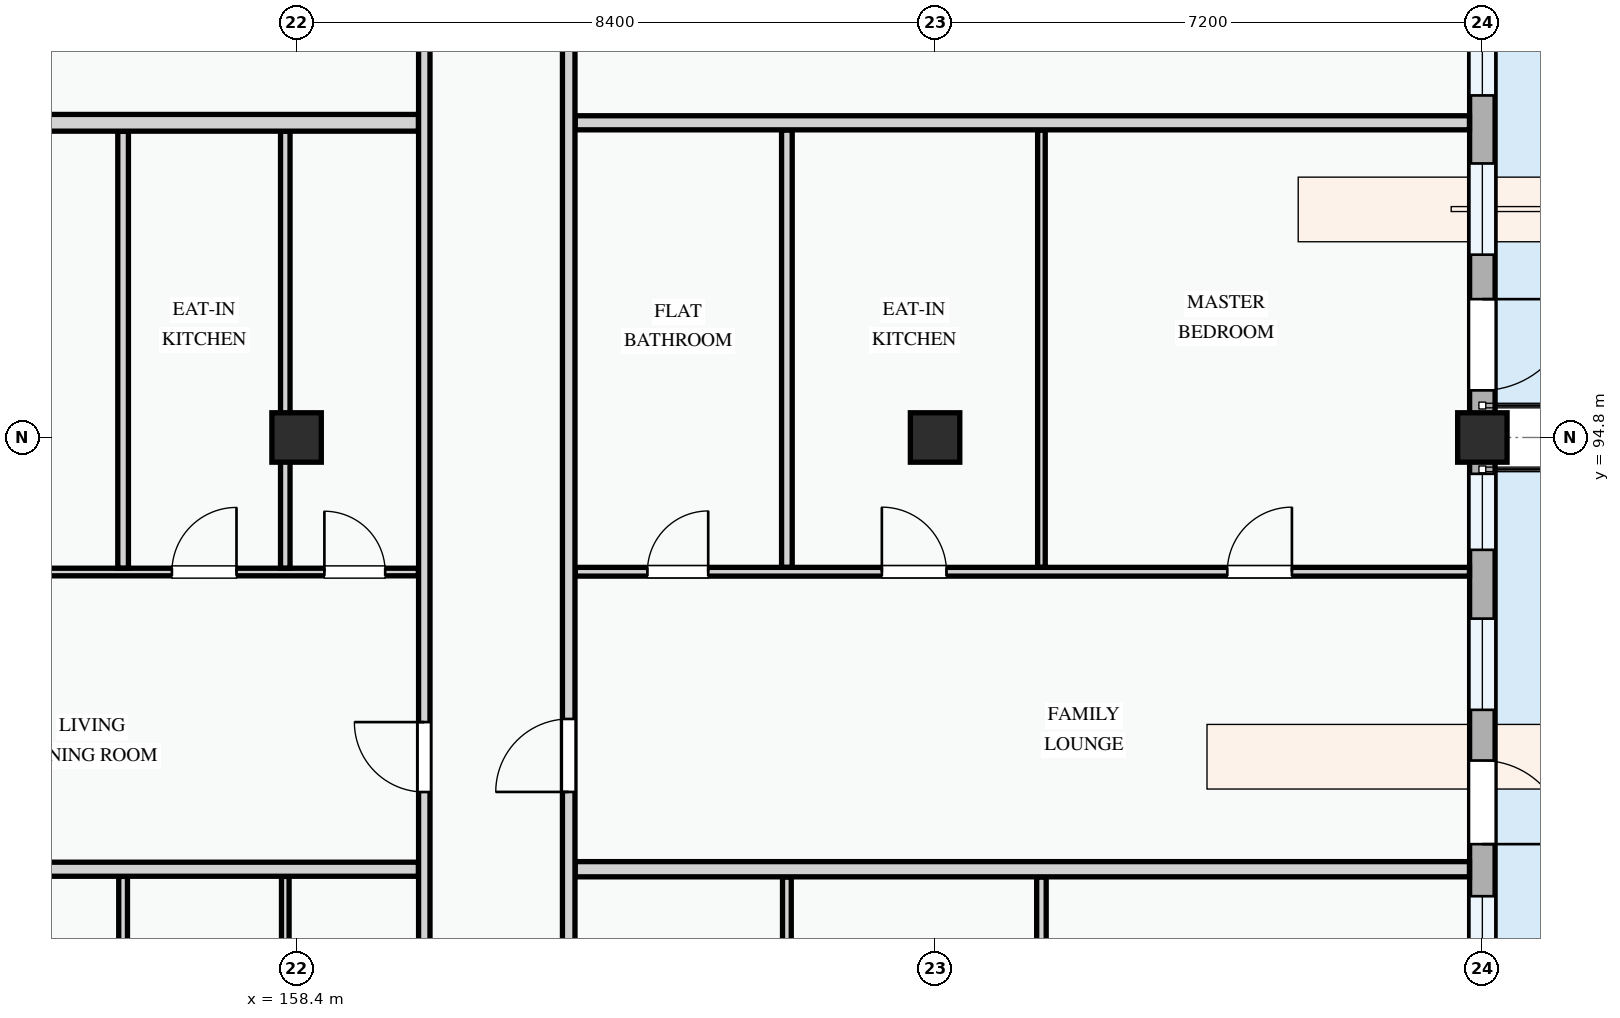
"""IFC4 building model, lengths in metres.
Left out: names, types, materials, properties, quantities, classifications, styles, units other than length and angle.
Written with IfcOpenShell. Run it as: python <this file> out.ifc"""

import sys

from ifc_helpers import new_model, si_unit, direction, frame, frame_2d, origin, origin_2d, place, context, subcontext, project, spatial, rectangle, extrude, element, fill, save


model = new_model("IFC4")
c1 = context("Model", 3, precision=1e-05, world=origin(), true_north=direction((0.0, 1.0)))
c2 = subcontext(c1, "Body", "Model", "MODEL_VIEW")
j1 = project(units=[si_unit("LENGTHUNIT", "METRE"), si_unit("PLANEANGLEUNIT", "RADIAN")], contexts=[c1])
p1 = place(None, origin())
s1 = spatial("IfcSite", under=j1, at=p1, CompositionType="ELEMENT")
p2 = place(p1, origin())
s2 = spatial("IfcBuilding", under=s1, at=p2, CompositionType="ELEMENT")
p3 = place(p2, frame((0.0, 0.0, 14.7)))
s3 = spatial("IfcBuildingStorey", under=s2, at=p3, CompositionType="ELEMENT", Elevation=14.7)
for number, where, z_axis, x_axis in (
    (1, (158.4, 94.8, 0.0), (0.0, 0.0, 1.0), (1.0, 0.0, 0.0)),
    (2, (166.8, 94.8, 0.0), (0.0, 0.0, 1.0), (1.0, 0.0, 0.0)),
    (3, (174.0, 94.8, 0.0), (0.0, 0.0, 1.0), (1.0, 0.0, 0.0)),
):
    element("IfcColumn", number, at=place(p3, frame(where, z_axis=z_axis, x_axis=x_axis)), inside=s3, PredefinedType="COLUMN", context=c2, shape_type="SweptSolid", body=[
        extrude(rectangle(XDim=0.65, YDim=0.65, at=origin_2d()), origin(), (0.0, 0.0, 1.0), 3.3),
    ])
p4 = place(p3, frame((174.0, 86.4, 0.0), z_axis=(0.0, 0.0, 1.0), x_axis=(0.0, 1.0, 0.0)))
e4 = element("IfcWall", 4, at=p4, inside=s3, PredefinedType="STANDARD", context=c2, shape_type="SweptSolid", body=[
    extrude(rectangle(XDim=8.4, YDim=0.335, at=frame_2d((4.2, 0.0))), origin(), (0.0, 0.0, 1.0), 2.425),
])
p5 = place(p4, frame((3.05, 0.0, 0.0)))
e5 = element("IfcOpeningElement", 5, at=p5, cuts=e4, PredefinedType="OPENING", context=c2, shape_type="SweptSolid", body=[
    extrude(rectangle(XDim=1.1, YDim=2.15, at=frame_2d((0.55, 1.075))), frame((0.0, 0.177, 0.0), z_axis=(0.0, -1.0, 0.0), x_axis=(1.0, 0.0, 0.0)), (0.0, 0.0, 1.0), 0.355),
])
p6 = place(p4, frame((0.545, 0.0, 0.78)))
e6 = element("IfcOpeningElement", 6, at=p6, cuts=e4, PredefinedType="OPENING", context=c2, shape_type="SweptSolid", body=[
    extrude(rectangle(XDim=1.82, YDim=1.46, at=frame_2d((0.91, 0.73))), frame((0.0, 0.177, 0.0), z_axis=(0.0, -1.0, 0.0), x_axis=(1.0, 0.0, 0.0)), (0.0, 0.0, 1.0), 0.355),
])
p7 = place(p4, frame((4.817, 0.0, 0.78)))
e7 = element("IfcOpeningElement", 7, at=p7, cuts=e4, PredefinedType="OPENING", context=c2, shape_type="SweptSolid", body=[
    extrude(rectangle(XDim=1.2, YDim=1.35, at=frame_2d((0.6, 0.675))), frame((0.0, 0.177, 0.0), z_axis=(0.0, -1.0, 0.0), x_axis=(1.0, 0.0, 0.0)), (0.0, 0.0, 1.0), 0.355),
])
p8 = place(p4, frame((6.922, 0.0, 0.78)))
e8 = element("IfcOpeningElement", 8, at=p8, cuts=e4, PredefinedType="OPENING", context=c2, shape_type="SweptSolid", body=[
    extrude(rectangle(XDim=1.0, YDim=1.25, at=frame_2d((0.5, 0.625))), frame((0.0, 0.177, 0.0), z_axis=(0.0, -1.0, 0.0), x_axis=(1.0, 0.0, 0.0)), (0.0, 0.0, 1.0), 0.355),
])
p9 = place(p3, frame((174.0, 94.8, 0.0), z_axis=(0.0, 0.0, 1.0), x_axis=(0.0, 1.0, 0.0)))
e9 = element("IfcWall", 9, at=p9, inside=s3, PredefinedType="STANDARD", context=c2, shape_type="SweptSolid", body=[
    extrude(rectangle(XDim=6.0, YDim=0.335, at=frame_2d((3.0, 0.0))), origin(), (0.0, 0.0, 1.0), 2.575),
])
p10 = place(p9, frame((0.62, 0.0, 0.0)))
e10 = element("IfcOpeningElement", 10, at=p10, cuts=e9, PredefinedType="OPENING", context=c2, shape_type="SweptSolid", body=[
    extrude(rectangle(XDim=1.2, YDim=2.15, at=frame_2d((0.6, 1.075))), frame((0.0, 0.177, 0.0), z_axis=(0.0, -1.0, 0.0), x_axis=(1.0, 0.0, 0.0)), (0.0, 0.0, 1.0), 0.355),
])
p11 = place(p9, frame((2.405, 0.0, 0.78)))
e11 = element("IfcOpeningElement", 11, at=p11, cuts=e9, PredefinedType="OPENING", context=c2, shape_type="SweptSolid", body=[
    extrude(rectangle(XDim=1.2, YDim=1.5, at=frame_2d((0.6, 0.75))), frame((0.0, 0.177, 0.0), z_axis=(0.0, -1.0, 0.0), x_axis=(1.0, 0.0, 0.0)), (0.0, 0.0, 1.0), 0.355),
])
p12 = place(p9, frame((4.5, 0.0, 0.78)))
e12 = element("IfcOpeningElement", 12, at=p12, cuts=e9, PredefinedType="OPENING", context=c2, shape_type="SweptSolid", body=[
    extrude(rectangle(XDim=0.95, YDim=1.15, at=frame_2d((0.475, 0.575))), frame((0.0, 0.177, 0.0), z_axis=(0.0, -1.0, 0.0), x_axis=(1.0, 0.0, 0.0)), (0.0, 0.0, 1.0), 0.355),
])
p13 = place(p3, frame((156.118, 84.655, 0.0), z_axis=(0.0, 0.0, 1.0), x_axis=(0.0, 1.0, 0.0)))
e13 = element("IfcWall", 13, at=p13, inside=s3, PredefinedType="PARTITIONING", context=c2, shape_type="SweptSolid", body=[
    extrude(rectangle(XDim=4.371, YDim=0.115, at=frame_2d((2.186, 0.0))), origin(), (0.0, 0.0, 1.0), 3.0),
])
p14 = place(p3, frame((158.251, 84.655, 0.0), z_axis=(0.0, 0.0, 1.0), x_axis=(0.0, 1.0, 0.0)))
e14 = element("IfcWall", 14, at=p14, inside=s3, PredefinedType="PARTITIONING", context=c2, shape_type="SweptSolid", body=[
    extrude(rectangle(XDim=4.371, YDim=0.1, at=frame_2d((2.186, 0.0))), origin(), (0.0, 0.0, 1.0), 2.425),
])
p15 = place(p3, frame((168.199, 84.689, 0.0), z_axis=(0.0, 0.0, 1.0), x_axis=(0.0, 1.0, 0.0)))
e15 = element("IfcWall", 15, at=p15, inside=s3, PredefinedType="PARTITIONING", context=c2, shape_type="SweptSolid", body=[
    extrude(rectangle(XDim=4.329, YDim=0.125, at=frame_2d((2.165, 0.0))), origin(), (0.0, 0.0, 1.0), 3.0),
])
p16 = place(p3, frame((164.85, 84.689, 0.0), z_axis=(0.0, 0.0, 1.0), x_axis=(0.0, 1.0, 0.0)))
e16 = element("IfcWall", 16, at=p16, inside=s3, PredefinedType="PARTITIONING", context=c2, shape_type="SweptSolid", body=[
    extrude(rectangle(XDim=4.329, YDim=0.115, at=frame_2d((2.165, 0.0))), origin(), (0.0, 0.0, 1.0), 3.0),
])
p17 = place(p3, frame((152.57, 93.03, 0.0), z_axis=(0.0, 0.0, 1.0), x_axis=(1.0, 0.0, 0.0)))
e17 = element("IfcWall", 17, at=p17, inside=s3, PredefinedType="PARTITIONING", context=c2, shape_type="SweptSolid", body=[
    extrude(rectangle(XDim=7.433, YDim=0.1, at=frame_2d((3.717, 0.0))), origin(), (0.0, 0.0, 1.0), 3.0),
])
p18 = place(p17, frame((1.294, 0.0, 0.0)))
e18 = element("IfcOpeningElement", 18, at=p18, cuts=e17, PredefinedType="OPENING", context=c2, shape_type="SweptSolid", body=[
    extrude(rectangle(XDim=0.85, YDim=2.1, at=frame_2d((0.425, 1.05))), frame((0.0, 0.06, 0.0), z_axis=(0.0, -1.0, 0.0), x_axis=(1.0, 0.0, 0.0)), (0.0, 0.0, 1.0), 0.12),
])
p19 = place(p17, frame((4.19, 0.0, 0.0)))
e19 = element("IfcOpeningElement", 19, at=p19, cuts=e17, PredefinedType="OPENING", context=c2, shape_type="SweptSolid", body=[
    extrude(rectangle(XDim=0.85, YDim=2.1, at=frame_2d((0.425, 1.05))), frame((0.0, 0.06, 0.0), z_axis=(0.0, -1.0, 0.0), x_axis=(1.0, 0.0, 0.0)), (0.0, 0.0, 1.0), 0.12),
])
p20 = place(p17, frame((6.196, 0.0, 0.0)))
e20 = element("IfcOpeningElement", 20, at=p20, cuts=e17, PredefinedType="OPENING", context=c2, shape_type="SweptSolid", body=[
    extrude(rectangle(XDim=0.8, YDim=2.1, at=frame_2d((0.4, 1.05))), frame((0.0, 0.06, 0.0), z_axis=(0.0, -1.0, 0.0), x_axis=(1.0, 0.0, 0.0)), (0.0, 0.0, 1.0), 0.12),
])
p21 = place(p3, frame((156.118, 93.082, 0.0), z_axis=(0.0, 0.0, 1.0), x_axis=(0.0, 1.0, 0.0)))
e21 = element("IfcWall", 21, at=p21, inside=s3, PredefinedType="PARTITIONING", context=c2, shape_type="SweptSolid", body=[
    extrude(rectangle(XDim=5.746, YDim=0.14, at=frame_2d((2.873, 0.0))), origin(), (0.0, 0.0, 1.0), 3.0),
])
p22 = place(p3, frame((158.251, 93.082, 0.0), z_axis=(0.0, 0.0, 1.0), x_axis=(0.0, 1.0, 0.0)))
e22 = element("IfcWall", 22, at=p22, inside=s3, PredefinedType="PARTITIONING", context=c2, shape_type="SweptSolid", body=[
    extrude(rectangle(XDim=5.746, YDim=0.125, at=frame_2d((2.873, 0.0))), origin(), (0.0, 0.0, 1.0), 2.425),
])
p23 = place(p3, frame((162.064, 93.034, 0.0), z_axis=(0.0, 0.0, 1.0), x_axis=(1.0, 0.0, 0.0)))
e23 = element("IfcWall", 23, at=p23, inside=s3, PredefinedType="PARTITIONING", context=c2, shape_type="SweptSolid", body=[
    extrude(rectangle(XDim=11.766, YDim=0.115, at=frame_2d((5.883, 0.0))), origin(), (0.0, 0.0, 1.0), 3.0),
])
p24 = place(p23, frame((0.951, 0.0, 0.0)))
e24 = element("IfcOpeningElement", 24, at=p24, cuts=e23, PredefinedType="OPENING", context=c2, shape_type="SweptSolid", body=[
    extrude(rectangle(XDim=0.8, YDim=2.1, at=frame_2d((0.4, 1.05))), frame((0.0, 0.067, 0.0), z_axis=(0.0, -1.0, 0.0), x_axis=(1.0, 0.0, 0.0)), (0.0, 0.0, 1.0), 0.135),
])
p25 = place(p23, frame((4.035, 0.0, 0.0)))
e25 = element("IfcOpeningElement", 25, at=p25, cuts=e23, PredefinedType="OPENING", context=c2, shape_type="SweptSolid", body=[
    extrude(rectangle(XDim=0.85, YDim=2.1, at=frame_2d((0.425, 1.05))), frame((0.0, 0.067, 0.0), z_axis=(0.0, -1.0, 0.0), x_axis=(1.0, 0.0, 0.0)), (0.0, 0.0, 1.0), 0.135),
])
p26 = place(p23, frame((8.58, 0.0, 0.0)))
e26 = element("IfcOpeningElement", 26, at=p26, cuts=e23, PredefinedType="OPENING", context=c2, shape_type="SweptSolid", body=[
    extrude(rectangle(XDim=0.85, YDim=2.1, at=frame_2d((0.425, 1.05))), frame((0.0, 0.067, 0.0), z_axis=(0.0, -1.0, 0.0), x_axis=(1.0, 0.0, 0.0)), (0.0, 0.0, 1.0), 0.135),
])
p27 = place(p3, frame((168.199, 93.093, 0.0), z_axis=(0.0, 0.0, 1.0), x_axis=(0.0, 1.0, 0.0)))
e27 = element("IfcWall", 27, at=p27, inside=s3, PredefinedType="PARTITIONING", context=c2, shape_type="SweptSolid", body=[
    extrude(rectangle(XDim=5.752, YDim=0.1, at=frame_2d((2.876, 0.0))), origin(), (0.0, 0.0, 1.0), 3.0),
])
p28 = place(p3, frame((164.85, 93.093, 0.0), z_axis=(0.0, 0.0, 1.0), x_axis=(0.0, 1.0, 0.0)))
e28 = element("IfcWall", 28, at=p28, inside=s3, PredefinedType="PARTITIONING", context=c2, shape_type="SweptSolid", body=[
    extrude(rectangle(XDim=5.752, YDim=0.14, at=frame_2d((2.876, 0.0))), origin(), (0.0, 0.0, 1.0), 3.0),
])
p29 = place(p3, frame((152.57, 89.12, 0.0), z_axis=(0.0, 0.0, 1.0), x_axis=(1.0, 0.0, 0.0)))
e29 = element("IfcWall", 29, at=p29, inside=s3, PredefinedType="PARTITIONING", context=c2, shape_type="SweptSolid", body=[
    extrude(rectangle(XDim=7.433, YDim=0.185, at=frame_2d((3.717, 0.0))), origin(), (0.0, 0.0, 1.0), 3.0),
])
p30 = place(p3, frame((162.064, 89.12, 0.0), z_axis=(0.0, 0.0, 1.0), x_axis=(1.0, 0.0, 0.0)))
e30 = element("IfcWall", 30, at=p30, inside=s3, PredefinedType="PARTITIONING", context=c2, shape_type="SweptSolid", body=[
    extrude(rectangle(XDim=11.766, YDim=0.2, at=frame_2d((5.883, 0.0))), origin(), (0.0, 0.0, 1.0), 3.0),
])
p31 = place(p3, frame((152.57, 98.94, 0.0), z_axis=(0.0, 0.0, 1.0), x_axis=(1.0, 0.0, 0.0)))
e31 = element("IfcWall", 31, at=p31, inside=s3, PredefinedType="PARTITIONING", context=c2, shape_type="SweptSolid", body=[
    extrude(rectangle(XDim=7.433, YDim=0.22, at=frame_2d((3.717, 0.0))), origin(), (0.0, 0.0, 1.0), 3.0),
])
p32 = place(p3, frame((162.064, 98.94, 0.0), z_axis=(0.0, 0.0, 1.0), x_axis=(1.0, 0.0, 0.0)))
e32 = element("IfcWall", 32, at=p32, inside=s3, PredefinedType="PARTITIONING", context=c2, shape_type="SweptSolid", body=[
    extrude(rectangle(XDim=11.766, YDim=0.185, at=frame_2d((5.883, 0.0))), origin(), (0.0, 0.0, 1.0), 3.0),
])
p33 = place(p3, frame((160.08, 80.57, 0.0), z_axis=(0.0, 0.0, 1.0), x_axis=(0.0, 1.0, 0.0)))
e33 = element("IfcWall", 33, at=p33, inside=s3, PredefinedType="PARTITIONING", context=c2, shape_type="SweptSolid", body=[
    extrude(rectangle(XDim=28.771, YDim=0.15, at=frame_2d((14.385, 0.0))), origin(), (0.0, 0.0, 1.0), 3.0),
])
p34 = place(p33, frame((2.31, 0.0, 0.0)))
e34 = element("IfcOpeningElement", 34, at=p34, cuts=e33, PredefinedType="OPENING", context=c2, shape_type="SweptSolid", body=[
    extrude(rectangle(XDim=0.92, YDim=2.1, at=frame_2d((0.46, 1.05))), frame((0.0, 0.085, 0.0), z_axis=(0.0, -1.0, 0.0), x_axis=(1.0, 0.0, 0.0)), (0.0, 0.0, 1.0), 0.17),
])
p35 = place(p33, frame((9.566, 0.0, 0.0)))
e35 = element("IfcOpeningElement", 35, at=p35, cuts=e33, PredefinedType="OPENING", context=c2, shape_type="SweptSolid", body=[
    extrude(rectangle(XDim=0.92, YDim=2.1, at=frame_2d((0.46, 1.05))), frame((0.0, 0.085, 0.0), z_axis=(0.0, -1.0, 0.0), x_axis=(1.0, 0.0, 0.0)), (0.0, 0.0, 1.0), 0.17),
])
p36 = place(p33, frame((22.361, 0.0, 0.0)))
e36 = element("IfcOpeningElement", 36, at=p36, cuts=e33, PredefinedType="OPENING", context=c2, shape_type="SweptSolid", body=[
    extrude(rectangle(XDim=0.92, YDim=2.1, at=frame_2d((0.46, 1.05))), frame((0.0, 0.085, 0.0), z_axis=(0.0, -1.0, 0.0), x_axis=(1.0, 0.0, 0.0)), (0.0, 0.0, 1.0), 0.17),
])
p37 = place(p3, frame((161.98, 80.57, 0.0), z_axis=(0.0, 0.0, 1.0), x_axis=(0.0, 1.0, 0.0)))
e37 = element("IfcWall", 37, at=p37, inside=s3, PredefinedType="PARTITIONING", context=c2, shape_type="SweptSolid", body=[
    extrude(rectangle(XDim=28.771, YDim=0.165, at=frame_2d((14.385, 0.0))), origin(), (0.0, 0.0, 1.0), 3.0),
])
p38 = place(p37, frame((2.332, 0.0, 0.0)))
e38 = element("IfcOpeningElement", 38, at=p38, cuts=e37, PredefinedType="OPENING", context=c2, shape_type="SweptSolid", body=[
    extrude(rectangle(XDim=0.92, YDim=2.1, at=frame_2d((0.46, 1.05))), frame((0.0, 0.093, 0.0), z_axis=(0.0, -1.0, 0.0), x_axis=(1.0, 0.0, 0.0)), (0.0, 0.0, 1.0), 0.185),
])
p39 = place(p37, frame((9.567, 0.0, 0.0)))
e39 = element("IfcOpeningElement", 39, at=p39, cuts=e37, PredefinedType="OPENING", context=c2, shape_type="SweptSolid", body=[
    extrude(rectangle(XDim=0.96, YDim=2.12, at=frame_2d((0.48, 1.06))), frame((0.0, 0.093, 0.0), z_axis=(0.0, -1.0, 0.0), x_axis=(1.0, 0.0, 0.0)), (0.0, 0.0, 1.0), 0.185),
])
p40 = place(p37, frame((22.153, 0.0, 0.0)))
e40 = element("IfcOpeningElement", 40, at=p40, cuts=e37, PredefinedType="OPENING", context=c2, shape_type="SweptSolid", body=[
    extrude(rectangle(XDim=0.92, YDim=2.1, at=frame_2d((0.46, 1.05))), frame((0.0, 0.093, 0.0), z_axis=(0.0, -1.0, 0.0), x_axis=(1.0, 0.0, 0.0)), (0.0, 0.0, 1.0), 0.185),
])
p41 = place(p5, frame((1.1, 0.0, 0.0), z_axis=(0.0, 0.0, 1.0), x_axis=(-1.0, 0.0, 0.0)))
e41 = element("IfcDoor", 41, at=p41, inside=s3, OperationType="SINGLE_SWING_RIGHT", PredefinedType="DOOR", context=c2, shape_type="SweptSolid", body=[
    extrude(rectangle(XDim=1.1, YDim=2.15, at=frame_2d((0.55, 1.075))), frame((0.0, 0.025, 0.0), z_axis=(0.0, -1.0, 0.0), x_axis=(1.0, 0.0, 0.0)), (0.0, 0.0, 1.0), 0.05),
])
fill(e5, e41)
p42 = place(p6, origin())
e42 = element("IfcWindow", 42, at=p42, inside=s3, PartitioningType="DOUBLE_PANEL_VERTICAL", PredefinedType="WINDOW", context=c2, shape_type="SweptSolid", body=[
    extrude(rectangle(XDim=1.82, YDim=1.46, at=frame_2d((0.91, 0.73))), frame((0.0, 0.03, 0.0), z_axis=(0.0, -1.0, 0.0), x_axis=(1.0, 0.0, 0.0)), (0.0, 0.0, 1.0), 0.06),
])
fill(e6, e42)
p43 = place(p7, origin())
e43 = element("IfcWindow", 43, at=p43, inside=s3, PartitioningType="SINGLE_PANEL", PredefinedType="WINDOW", context=c2, shape_type="SweptSolid", body=[
    extrude(rectangle(XDim=1.2, YDim=1.35, at=frame_2d((0.6, 0.675))), frame((0.0, 0.03, 0.0), z_axis=(0.0, -1.0, 0.0), x_axis=(1.0, 0.0, 0.0)), (0.0, 0.0, 1.0), 0.06),
])
fill(e7, e43)
p44 = place(p8, origin())
e44 = element("IfcWindow", 44, at=p44, inside=s3, PartitioningType="SINGLE_PANEL", PredefinedType="WINDOW", context=c2, shape_type="SweptSolid", body=[
    extrude(rectangle(XDim=1.0, YDim=1.25, at=frame_2d((0.5, 0.625))), frame((0.0, 0.03, 0.0), z_axis=(0.0, -1.0, 0.0), x_axis=(1.0, 0.0, 0.0)), (0.0, 0.0, 1.0), 0.06),
])
fill(e8, e44)
p45 = place(p10, frame((1.2, 0.0, 0.0), z_axis=(0.0, 0.0, 1.0), x_axis=(-1.0, 0.0, 0.0)))
e45 = element("IfcDoor", 45, at=p45, inside=s3, OperationType="SINGLE_SWING_LEFT", PredefinedType="DOOR", context=c2, shape_type="SweptSolid", body=[
    extrude(rectangle(XDim=1.2, YDim=2.15, at=frame_2d((0.6, 1.075))), frame((0.0, 0.025, 0.0), z_axis=(0.0, -1.0, 0.0), x_axis=(1.0, 0.0, 0.0)), (0.0, 0.0, 1.0), 0.05),
])
fill(e10, e45)
p46 = place(p11, origin())
e46 = element("IfcWindow", 46, at=p46, inside=s3, PartitioningType="SINGLE_PANEL", PredefinedType="WINDOW", context=c2, shape_type="SweptSolid", body=[
    extrude(rectangle(XDim=1.2, YDim=1.5, at=frame_2d((0.6, 0.75))), frame((0.0, 0.03, 0.0), z_axis=(0.0, -1.0, 0.0), x_axis=(1.0, 0.0, 0.0)), (0.0, 0.0, 1.0), 0.06),
])
fill(e11, e46)
p47 = place(p12, origin())
e47 = element("IfcWindow", 47, at=p47, inside=s3, PartitioningType="SINGLE_PANEL", PredefinedType="WINDOW", context=c2, shape_type="SweptSolid", body=[
    extrude(rectangle(XDim=0.95, YDim=1.15, at=frame_2d((0.475, 0.575))), frame((0.0, 0.03, 0.0), z_axis=(0.0, -1.0, 0.0), x_axis=(1.0, 0.0, 0.0)), (0.0, 0.0, 1.0), 0.06),
])
fill(e12, e47)
p48 = place(p19, origin())
e48 = element("IfcDoor", 48, at=p48, inside=s3, OperationType="SINGLE_SWING_RIGHT", PredefinedType="DOOR", context=c2, shape_type="SweptSolid", body=[
    extrude(rectangle(XDim=0.85, YDim=2.1, at=frame_2d((0.425, 1.05))), frame((0.0, 0.025, 0.0), z_axis=(0.0, -1.0, 0.0), x_axis=(1.0, 0.0, 0.0)), (0.0, 0.0, 1.0), 0.05),
])
fill(e19, e48)
p49 = place(p20, origin())
e49 = element("IfcDoor", 49, at=p49, inside=s3, OperationType="SINGLE_SWING_LEFT", PredefinedType="DOOR", context=c2, shape_type="SweptSolid", body=[
    extrude(rectangle(XDim=0.8, YDim=2.1, at=frame_2d((0.4, 1.05))), frame((0.0, 0.025, 0.0), z_axis=(0.0, -1.0, 0.0), x_axis=(1.0, 0.0, 0.0)), (0.0, 0.0, 1.0), 0.05),
])
fill(e20, e49)
p50 = place(p24, origin())
e50 = element("IfcDoor", 50, at=p50, inside=s3, OperationType="SINGLE_SWING_RIGHT", PredefinedType="DOOR", context=c2, shape_type="SweptSolid", body=[
    extrude(rectangle(XDim=0.8, YDim=2.1, at=frame_2d((0.4, 1.05))), frame((0.0, 0.025, 0.0), z_axis=(0.0, -1.0, 0.0), x_axis=(1.0, 0.0, 0.0)), (0.0, 0.0, 1.0), 0.05),
])
fill(e24, e50)
p51 = place(p25, origin())
e51 = element("IfcDoor", 51, at=p51, inside=s3, OperationType="SINGLE_SWING_LEFT", PredefinedType="DOOR", context=c2, shape_type="SweptSolid", body=[
    extrude(rectangle(XDim=0.85, YDim=2.1, at=frame_2d((0.425, 1.05))), frame((0.0, 0.025, 0.0), z_axis=(0.0, -1.0, 0.0), x_axis=(1.0, 0.0, 0.0)), (0.0, 0.0, 1.0), 0.05),
])
fill(e25, e51)
p52 = place(p26, origin())
e52 = element("IfcDoor", 52, at=p52, inside=s3, OperationType="SINGLE_SWING_RIGHT", PredefinedType="DOOR", context=c2, shape_type="SweptSolid", body=[
    extrude(rectangle(XDim=0.85, YDim=2.1, at=frame_2d((0.425, 1.05))), frame((0.0, 0.025, 0.0), z_axis=(0.0, -1.0, 0.0), x_axis=(1.0, 0.0, 0.0)), (0.0, 0.0, 1.0), 0.05),
])
fill(e26, e52)
p53 = place(p35, origin())
e53 = element("IfcDoor", 53, at=p53, inside=s3, OperationType="SINGLE_SWING_RIGHT", PredefinedType="DOOR", context=c2, shape_type="SweptSolid", body=[
    extrude(rectangle(XDim=0.92, YDim=2.1, at=frame_2d((0.46, 1.05))), frame((0.0, 0.025, 0.0), z_axis=(0.0, -1.0, 0.0), x_axis=(1.0, 0.0, 0.0)), (0.0, 0.0, 1.0), 0.05),
])
fill(e35, e53)
p54 = place(p39, origin())
e54 = element("IfcDoor", 54, at=p54, inside=s3, OperationType="SINGLE_SWING_LEFT", PredefinedType="DOOR", context=c2, shape_type="SweptSolid", body=[
    extrude(rectangle(XDim=0.96, YDim=2.12, at=frame_2d((0.48, 1.06))), frame((0.0, 0.025, 0.0), z_axis=(0.0, -1.0, 0.0), x_axis=(1.0, 0.0, 0.0)), (0.0, 0.0, 1.0), 0.05),
])
fill(e39, e54)
save(model, sys.argv[1])
